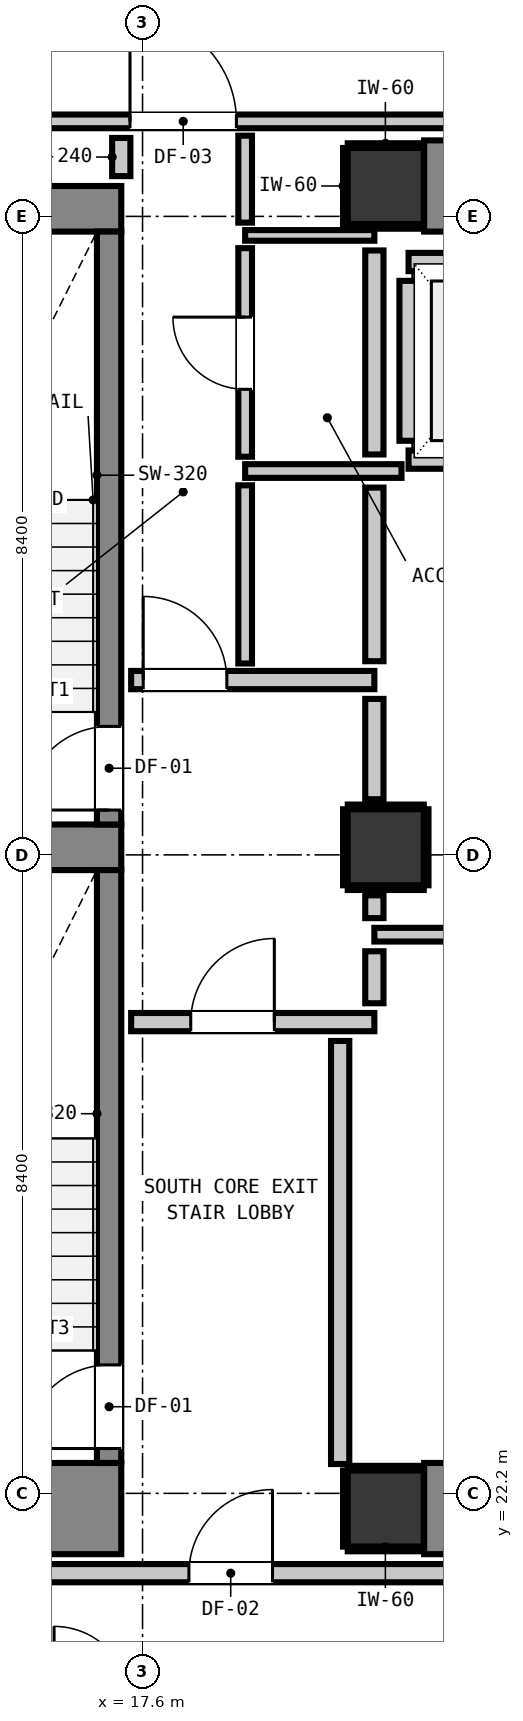
"""IFC4 building model, lengths in metres.
Left out: names, types, materials, properties, quantities, classifications, styles, units other than length and angle.
Written with IfcOpenShell. Run it as: python <this file> out.ifc"""

import sys

from ifc_helpers import new_model, si_unit, direction, frame, frame_2d, origin, origin_2d, place, context, subcontext, project, spatial, rectangle, extrude, element, fill, save


model = new_model("IFC4")
c1 = context("Model", 3, precision=1e-05, world=origin(), true_north=direction((0.0, 1.0)))
c2 = subcontext(c1, "Body", "Model", "MODEL_VIEW")
j1 = project(units=[si_unit("LENGTHUNIT", "METRE"), si_unit("PLANEANGLEUNIT", "RADIAN")], contexts=[c1])
p1 = place(None, origin())
s1 = spatial("IfcSite", under=j1, at=p1, CompositionType="ELEMENT")
p2 = place(p1, origin())
s2 = spatial("IfcBuilding", under=s1, at=p2, CompositionType="ELEMENT")
p3 = place(p2, frame((0.0, 0.0, 55.2)))
s3 = spatial("IfcBuildingStorey", under=s2, at=p3, CompositionType="ELEMENT", Elevation=55.2)
for number, where, z_axis, x_axis in (
    (1, (20.8, 22.0, 0.0), (0.0, 0.0, 1.0), (1.0, 0.0, 0.0)),
    (2, (20.8, 39.4, 0.0), (0.0, 0.0, 1.0), (1.0, 0.0, 0.0)),
):
    element("IfcColumn", number, at=place(p3, frame(where, z_axis=z_axis, x_axis=x_axis)), inside=s3, PredefinedType="COLUMN", context=c2, shape_type="SweptSolid", body=[
        extrude(rectangle(XDim=1.0, YDim=1.0, at=origin_2d()), origin(), (0.0, 0.0, 1.0), 3.32),
    ])
p4 = place(p3, frame((13.24, 22.0, 0.0), z_axis=(0.0, 0.0, 1.0), x_axis=(1.0, 0.0, 0.0)))
e3 = element("IfcWall", 3, at=p4, inside=s3, PredefinedType="SHEAR", context=c2, shape_type="SweptSolid", body=[
    extrude(rectangle(XDim=4.08, YDim=1.2, at=frame_2d((2.04, 0.0))), origin(), (0.0, 0.0, 1.0), 3.32),
])
p5 = place(p3, frame((13.24, 39.1, 0.0), z_axis=(0.0, 0.0, 1.0), x_axis=(1.0, 0.0, 0.0)))
e4 = element("IfcWall", 4, at=p5, inside=s3, PredefinedType="SHEAR", context=c2, shape_type="SweptSolid", body=[
    extrude(rectangle(XDim=4.08, YDim=0.6, at=frame_2d((2.04, 0.0))), origin(), (0.0, 0.0, 1.0), 3.32),
])
p6 = place(p3, frame((13.905, 30.7, 0.0), z_axis=(0.0, 0.0, 1.0), x_axis=(1.0, 0.0, 0.0)))
e5 = element("IfcWall", 5, at=p6, inside=s3, PredefinedType="SHEAR", context=c2, shape_type="SweptSolid", body=[
    extrude(rectangle(XDim=3.415, YDim=0.6, at=frame_2d((1.708, 0.0))), origin(), (0.0, 0.0, 1.0), 3.32),
])
for number, where, z_axis, x_axis in (
    (6, (21.305, 22.0, 0.0), (0.0, 0.0, 1.0), (1.0, 0.0, 0.0)),
    (7, (21.305, 39.4, 0.0), (0.0, 0.0, 1.0), (1.0, 0.0, 0.0)),
):
    element("IfcWall", number, at=place(p3, frame(where, z_axis=z_axis, x_axis=x_axis)), inside=s3, PredefinedType="SHEAR", context=c2, shape_type="SweptSolid", body=[
        extrude(rectangle(XDim=7.39, YDim=1.2, at=frame_2d((3.695, 0.0))), origin(), (0.0, 0.0, 1.0), 3.32),
    ])
p7 = place(p3, frame((17.16, 31.0, 0.0), z_axis=(0.0, 0.0, 1.0), x_axis=(0.0, 1.0, 0.0)))
e8 = element("IfcWall", 8, at=p7, inside=s3, PredefinedType="SHEAR", context=c2, shape_type="SweptSolid", body=[
    extrude(rectangle(XDim=7.8, YDim=0.32, at=frame_2d((3.9, 0.0))), origin(), (0.0, 0.0, 1.0), 3.32),
])
p8 = place(p7, frame((0.19, 0.0, 0.0)))
e9 = element("IfcOpeningElement", 9, at=p8, cuts=e8, PredefinedType="OPENING", context=c2, shape_type="SweptSolid", body=[
    extrude(rectangle(XDim=1.1, YDim=2.15, at=frame_2d((0.55, 1.075))), frame((0.0, 0.17, 0.0), z_axis=(0.0, -1.0, 0.0), x_axis=(1.0, 0.0, 0.0)), (0.0, 0.0, 1.0), 0.34),
])
p9 = place(p3, frame((17.16, 22.6, 0.0), z_axis=(0.0, 0.0, 1.0), x_axis=(0.0, 1.0, 0.0)))
e10 = element("IfcWall", 10, at=p9, inside=s3, PredefinedType="SHEAR", context=c2, shape_type="SweptSolid", body=[
    extrude(rectangle(XDim=7.8, YDim=0.32, at=frame_2d((3.9, 0.0))), origin(), (0.0, 0.0, 1.0), 3.32),
])
p10 = place(p9, frame((0.19, 0.0, 0.0)))
e11 = element("IfcOpeningElement", 11, at=p10, cuts=e10, PredefinedType="OPENING", context=c2, shape_type="SweptSolid", body=[
    extrude(rectangle(XDim=1.1, YDim=2.15, at=frame_2d((0.55, 1.075))), frame((0.0, 0.17, 0.0), z_axis=(0.0, -1.0, 0.0), x_axis=(1.0, 0.0, 0.0)), (0.0, 0.0, 1.0), 0.34),
])
p11 = place(p3, frame((20.8, 30.7, 0.0), z_axis=(0.0, 0.0, 1.0), x_axis=(1.0, 0.0, 0.0)))
e12 = element("IfcColumn", 12, at=p11, inside=s3, PredefinedType="COLUMN", context=c2, shape_type="SweptSolid", body=[
    extrude(rectangle(XDim=1.0, YDim=1.0, at=origin_2d()), origin(), (0.0, 0.0, 1.0), 3.32),
])
for number, where, z_axis, x_axis in (
    (13, (21.1, 35.8, 0.0), (0.0, 0.0, 1.0), (1.0, 0.0, 0.0)),
    (14, (21.1, 38.4, 0.0), (0.0, 0.0, 1.0), (1.0, 0.0, 0.0)),
):
    element("IfcWall", number, at=place(p3, frame(where, z_axis=z_axis, x_axis=x_axis)), inside=s3, PredefinedType="PARTITIONING", context=c2, shape_type="SweptSolid", body=[
        extrude(rectangle(XDim=2.2, YDim=0.24, at=frame_2d((1.1, 0.0))), origin(), (0.0, 0.0, 1.0), 3.06),
    ])
p12 = place(p3, frame((21.1, 36.048, 0.0), z_axis=(0.0, 0.0, 1.0), x_axis=(0.0, 1.0, 0.0)))
e15 = element("IfcWall", 15, at=p12, inside=s3, PredefinedType="PARTITIONING", context=c2, shape_type="SweptSolid", body=[
    extrude(rectangle(XDim=2.104, YDim=0.24, at=frame_2d((1.052, 0.0))), origin(), (0.0, 0.0, 1.0), 2.295),
])
p13 = place(p3, frame((10.15, 21.15, 0.0), z_axis=(0.0, 0.0, 1.0), x_axis=(1.0, 0.0, 0.0)))
e16 = element("IfcWall", 16, at=p13, inside=s3, PredefinedType="PARTITIONING", context=c2, shape_type="SweptSolid", body=[
    extrude(rectangle(XDim=40.023, YDim=0.24, at=frame_2d((20.012, 0.0))), origin(), (0.0, 0.0, 1.0), 3.06),
])
p14 = place(p13, frame((8.06, 0.0, 0.0)))
e17 = element("IfcOpeningElement", 17, at=p14, cuts=e16, PredefinedType="OPENING", context=c2, shape_type="SweptSolid", body=[
    extrude(rectangle(XDim=1.1, YDim=2.15, at=frame_2d((0.55, 1.075))), frame((0.0, 0.13, 0.0), z_axis=(0.0, -1.0, 0.0), x_axis=(1.0, 0.0, 0.0)), (0.0, 0.0, 1.0), 0.26),
])
p15 = place(p13, frame((0.324, 0.0, 0.0)))
e18 = element("IfcOpeningElement", 18, at=p15, cuts=e16, PredefinedType="OPENING", context=c2, shape_type="SweptSolid", body=[
    extrude(rectangle(XDim=1.4, YDim=2.15, at=frame_2d((0.7, 1.075))), frame((0.0, 0.13, 0.0), z_axis=(0.0, -1.0, 0.0), x_axis=(1.0, 0.0, 0.0)), (0.0, 0.0, 1.0), 0.26),
])
p16 = place(p13, frame((31.825, 0.0, 0.0)))
e19 = element("IfcOpeningElement", 19, at=p16, cuts=e16, PredefinedType="OPENING", context=c2, shape_type="SweptSolid", body=[
    extrude(rectangle(XDim=1.0, YDim=2.15, at=frame_2d((0.5, 1.075))), frame((0.0, 0.13, 0.0), z_axis=(0.0, -1.0, 0.0), x_axis=(1.0, 0.0, 0.0)), (0.0, 0.0, 1.0), 0.26),
])
p17 = place(p3, frame((17.45, 28.4, 0.0), z_axis=(0.0, 0.0, 1.0), x_axis=(1.0, 0.0, 0.0)))
e20 = element("IfcWall", 20, at=p17, inside=s3, PredefinedType="PARTITIONING", context=c2, shape_type="SweptSolid", body=[
    extrude(rectangle(XDim=3.2, YDim=0.24, at=frame_2d((1.6, 0.0))), origin(), (0.0, 0.0, 1.0), 3.06),
])
p18 = place(p17, frame((0.784, 0.0, 0.0)))
e21 = element("IfcOpeningElement", 21, at=p18, cuts=e20, PredefinedType="OPENING", context=c2, shape_type="SweptSolid", body=[
    extrude(rectangle(XDim=1.1, YDim=2.15, at=frame_2d((0.55, 1.075))), frame((0.0, 0.13, 0.0), z_axis=(0.0, -1.0, 0.0), x_axis=(1.0, 0.0, 0.0)), (0.0, 0.0, 1.0), 0.26),
])
p19 = place(p3, frame((17.45, 32.9, 0.0), z_axis=(0.0, 0.0, 1.0), x_axis=(1.0, 0.0, 0.0)))
e22 = element("IfcWall", 22, at=p19, inside=s3, PredefinedType="PARTITIONING", context=c2, shape_type="SweptSolid", body=[
    extrude(rectangle(XDim=3.2, YDim=0.24, at=frame_2d((1.6, 0.0))), origin(), (0.0, 0.0, 1.0), 3.06),
])
p20 = place(p19, frame((0.159, 0.0, 0.0)))
e23 = element("IfcOpeningElement", 23, at=p20, cuts=e22, PredefinedType="OPENING", context=c2, shape_type="SweptSolid", body=[
    extrude(rectangle(XDim=1.1, YDim=2.15, at=frame_2d((0.55, 1.075))), frame((0.0, 0.13, 0.0), z_axis=(0.0, -1.0, 0.0), x_axis=(1.0, 0.0, 0.0)), (0.0, 0.0, 1.0), 0.26),
])
p21 = place(p3, frame((20.65, 29.55, 0.0), z_axis=(0.0, 0.0, 1.0), x_axis=(1.0, 0.0, 0.0)))
e24 = element("IfcWall", 24, at=p21, inside=s3, PredefinedType="PARTITIONING", context=c2, shape_type="SweptSolid", body=[
    extrude(rectangle(XDim=9.325, YDim=0.18, at=frame_2d((4.663, 0.0))), origin(), (0.0, 0.0, 1.0), 3.06),
])
p22 = place(p3, frame((18.95, 35.65, 0.0), z_axis=(0.0, 0.0, 1.0), x_axis=(1.0, 0.0, 0.0)))
e25 = element("IfcWall", 25, at=p22, inside=s3, PredefinedType="PARTITIONING", context=c2, shape_type="SweptSolid", body=[
    extrude(rectangle(XDim=2.057, YDim=0.18, at=frame_2d((1.029, 0.0))), origin(), (0.0, 0.0, 1.0), 3.06),
])
p23 = place(p3, frame((8.027, 40.25, 0.0), z_axis=(0.0, 0.0, 1.0), x_axis=(1.0, 0.0, 0.0)))
e26 = element("IfcWall", 26, at=p23, inside=s3, PredefinedType="PARTITIONING", context=c2, shape_type="SweptSolid", body=[
    extrude(rectangle(XDim=28.905, YDim=0.18, at=frame_2d((14.452, 0.0))), origin(), (0.0, 0.0, 1.0), 3.06),
])
p24 = place(p23, frame((9.408, 0.0, 0.0)))
e27 = element("IfcOpeningElement", 27, at=p24, cuts=e26, PredefinedType="OPENING", context=c2, shape_type="SweptSolid", body=[
    extrude(rectangle(XDim=1.4, YDim=2.15, at=frame_2d((0.7, 1.075))), frame((0.0, 0.1, 0.0), z_axis=(0.0, -1.0, 0.0), x_axis=(1.0, 0.0, 0.0)), (0.0, 0.0, 1.0), 0.2),
])
p25 = place(p23, frame((2.447, 0.0, 0.0)))
e28 = element("IfcOpeningElement", 28, at=p25, cuts=e26, PredefinedType="OPENING", context=c2, shape_type="SweptSolid", body=[
    extrude(rectangle(XDim=1.4, YDim=2.15, at=frame_2d((0.7, 1.075))), frame((0.0, 0.1, 0.0), z_axis=(0.0, -1.0, 0.0), x_axis=(1.0, 0.0, 0.0)), (0.0, 0.0, 1.0), 0.2),
])
p26 = place(p3, frame((18.95, 38.75, 0.0), z_axis=(0.0, 0.0, 1.0), x_axis=(1.0, 0.0, 0.0)))
e29 = element("IfcWall", 29, at=p26, inside=s3, PredefinedType="PARTITIONING", context=c2, shape_type="SweptSolid", body=[
    extrude(rectangle(XDim=1.7, YDim=0.14, at=frame_2d((0.85, 0.0))), origin(), (0.0, 0.0, 1.0), 3.06),
])
p27 = place(p3, frame((17.32, 39.53, 0.0), z_axis=(0.0, 0.0, 1.0), x_axis=(0.0, 1.0, 0.0)))
e30 = element("IfcWall", 30, at=p27, inside=s3, PredefinedType="PARTITIONING", context=c2, shape_type="SweptSolid", body=[
    extrude(rectangle(XDim=0.502, YDim=0.24, at=frame_2d((0.251, 0.0))), origin(), (0.0, 0.0, 1.0), 3.06),
])
p28 = place(p3, frame((20.2, 22.586, 0.0), z_axis=(0.0, 0.0, 1.0), x_axis=(0.0, 1.0, 0.0)))
e31 = element("IfcWall", 31, at=p28, inside=s3, PredefinedType="PARTITIONING", context=c2, shape_type="SweptSolid", body=[
    extrude(rectangle(XDim=5.566, YDim=0.24, at=frame_2d((2.783, 0.0))), origin(), (0.0, 0.0, 1.0), 3.06),
])
p29 = place(p3, frame((20.65, 28.648, 0.0), z_axis=(0.0, 0.0, 1.0), x_axis=(0.0, 1.0, 0.0)))
e32 = element("IfcWall", 32, at=p29, inside=s3, PredefinedType="PARTITIONING", context=c2, shape_type="SweptSolid", body=[
    extrude(rectangle(XDim=0.684, YDim=0.24, at=frame_2d((0.342, 0.0))), origin(), (0.0, 0.0, 1.0), 2.295),
])
p30 = place(p3, frame((20.65, 29.768, 0.0), z_axis=(0.0, 0.0, 1.0), x_axis=(0.0, 1.0, 0.0)))
e33 = element("IfcWall", 33, at=p30, inside=s3, PredefinedType="PARTITIONING", context=c2, shape_type="SweptSolid", body=[
    extrude(rectangle(XDim=0.3, YDim=0.24, at=frame_2d((0.15, 0.0))), origin(), (0.0, 0.0, 1.0), 2.295),
])
p31 = place(p3, frame((20.65, 31.332, 0.0), z_axis=(0.0, 0.0, 1.0), x_axis=(0.0, 1.0, 0.0)))
e34 = element("IfcWall", 34, at=p31, inside=s3, PredefinedType="PARTITIONING", context=c2, shape_type="SweptSolid", body=[
    extrude(rectangle(XDim=1.32, YDim=0.24, at=frame_2d((0.66, 0.0))), origin(), (0.0, 0.0, 1.0), 2.295),
])
p32 = place(p3, frame((20.65, 33.148, 0.0), z_axis=(0.0, 0.0, 1.0), x_axis=(0.0, 1.0, 0.0)))
e35 = element("IfcWall", 35, at=p32, inside=s3, PredefinedType="PARTITIONING", context=c2, shape_type="SweptSolid", body=[
    extrude(rectangle(XDim=2.284, YDim=0.24, at=frame_2d((1.142, 0.0))), origin(), (0.0, 0.0, 1.0), 2.295),
])
p33 = place(p3, frame((20.65, 35.868, 0.0), z_axis=(0.0, 0.0, 1.0), x_axis=(0.0, 1.0, 0.0)))
e36 = element("IfcWall", 36, at=p33, inside=s3, PredefinedType="PARTITIONING", context=c2, shape_type="SweptSolid", body=[
    extrude(rectangle(XDim=2.684, YDim=0.24, at=frame_2d((1.342, 0.0))), origin(), (0.0, 0.0, 1.0), 2.295),
])
p34 = place(p3, frame((18.95, 33.118, 0.0), z_axis=(0.0, 0.0, 1.0), x_axis=(0.0, 1.0, 0.0)))
e37 = element("IfcWall", 37, at=p34, inside=s3, PredefinedType="PARTITIONING", context=c2, shape_type="SweptSolid", body=[
    extrude(rectangle(XDim=2.344, YDim=0.18, at=frame_2d((1.172, 0.0))), origin(), (0.0, 0.0, 1.0), 3.06),
])
p35 = place(p3, frame((18.95, 35.838, 0.0), z_axis=(0.0, 0.0, 1.0), x_axis=(0.0, 1.0, 0.0)))
e38 = element("IfcWall", 38, at=p35, inside=s3, PredefinedType="PARTITIONING", context=c2, shape_type="SweptSolid", body=[
    extrude(rectangle(XDim=2.744, YDim=0.18, at=frame_2d((1.372, 0.0))), origin(), (0.0, 0.0, 1.0), 3.06),
])
p36 = place(p35, frame((0.887, 0.0, 0.0)))
e39 = element("IfcOpeningElement", 39, at=p36, cuts=e38, PredefinedType="OPENING", context=c2, shape_type="SweptSolid", body=[
    extrude(rectangle(XDim=0.95, YDim=2.1, at=frame_2d((0.475, 1.05))), frame((0.0, 0.1, 0.0), z_axis=(0.0, -1.0, 0.0), x_axis=(1.0, 0.0, 0.0)), (0.0, 0.0, 1.0), 0.2),
])
p37 = place(p3, frame((18.95, 38.918, 0.0), z_axis=(0.0, 0.0, 1.0), x_axis=(0.0, 1.0, 0.0)))
e40 = element("IfcWall", 40, at=p37, inside=s3, PredefinedType="PARTITIONING", context=c2, shape_type="SweptSolid", body=[
    extrude(rectangle(XDim=1.144, YDim=0.18, at=frame_2d((0.572, 0.0))), origin(), (0.0, 0.0, 1.0), 3.06),
])
for number, where, z_axis, x_axis in (
    (41, (20.3, 21.468, 0.0), (0.0, 0.0, 1.0), (1.0, 0.0, 0.0)),
    (42, (20.3, 22.532, 0.0), (0.0, 0.0, 1.0), (1.0, 0.0, 0.0)),
):
    element("IfcWall", number, at=place(p3, frame(where, z_axis=z_axis, x_axis=x_axis)), inside=s3, PredefinedType="PARTITIONING", context=c2, shape_type="SweptSolid", body=[
        extrude(rectangle(XDim=0.99, YDim=0.06, at=frame_2d((0.495, 0.0))), origin(), (0.0, 0.0, 1.0), 1.45),
    ])
p38 = place(p3, frame((20.268, 21.5, 0.0), z_axis=(0.0, 0.0, 1.0), x_axis=(0.0, 1.0, 0.0)))
e43 = element("IfcWall", 43, at=p38, inside=s3, PredefinedType="PARTITIONING", context=c2, shape_type="SweptSolid", body=[
    extrude(rectangle(XDim=1.0, YDim=0.06, at=frame_2d((0.5, 0.0))), origin(), (0.0, 0.0, 1.0), 1.45),
])
for number, where, z_axis, x_axis in (
    (44, (20.3, 38.868, 0.0), (0.0, 0.0, 1.0), (1.0, 0.0, 0.0)),
    (45, (20.3, 39.932, 0.0), (0.0, 0.0, 1.0), (1.0, 0.0, 0.0)),
):
    element("IfcWall", number, at=place(p3, frame(where, z_axis=z_axis, x_axis=x_axis)), inside=s3, PredefinedType="PARTITIONING", context=c2, shape_type="SweptSolid", body=[
        extrude(rectangle(XDim=0.99, YDim=0.06, at=frame_2d((0.495, 0.0))), origin(), (0.0, 0.0, 1.0), 1.45),
    ])
for number, where, z_axis, x_axis in (
    (46, (20.268, 38.9, 0.0), (0.0, 0.0, 1.0), (0.0, 1.0, 0.0)),
    (47, (20.3, 30.168, 0.0), (0.0, 0.0, 1.0), (1.0, 0.0, 0.0)),
    (48, (20.3, 31.232, 0.0), (0.0, 0.0, 1.0), (1.0, 0.0, 0.0)),
    (49, (20.268, 30.2, 0.0), (0.0, 0.0, 1.0), (0.0, 1.0, 0.0)),
    (50, (21.332, 30.2, 0.0), (0.0, 0.0, 1.0), (0.0, 1.0, 0.0)),
):
    element("IfcWall", number, at=place(p3, frame(where, z_axis=z_axis, x_axis=x_axis)), inside=s3, PredefinedType="PARTITIONING", context=c2, shape_type="SweptSolid", body=[
        extrude(rectangle(XDim=1.0, YDim=0.06, at=frame_2d((0.5, 0.0))), origin(), (0.0, 0.0, 1.0), 1.45),
    ])
p39 = place(p8, origin())
e51 = element("IfcDoor", 51, at=p39, inside=s3, OperationType="SINGLE_SWING_LEFT", PredefinedType="DOOR", context=c2, shape_type="SweptSolid", body=[
    extrude(rectangle(XDim=1.1, YDim=2.15, at=frame_2d((0.55, 1.075))), frame((0.0, 0.025, 0.0), z_axis=(0.0, -1.0, 0.0), x_axis=(1.0, 0.0, 0.0)), (0.0, 0.0, 1.0), 0.05),
])
fill(e9, e51)
p40 = place(p10, origin())
e52 = element("IfcDoor", 52, at=p40, inside=s3, OperationType="SINGLE_SWING_LEFT", PredefinedType="DOOR", context=c2, shape_type="SweptSolid", body=[
    extrude(rectangle(XDim=1.1, YDim=2.15, at=frame_2d((0.55, 1.075))), frame((0.0, 0.025, 0.0), z_axis=(0.0, -1.0, 0.0), x_axis=(1.0, 0.0, 0.0)), (0.0, 0.0, 1.0), 0.05),
])
fill(e11, e52)
p41 = place(p18, origin())
e53 = element("IfcDoor", 53, at=p41, inside=s3, OperationType="SINGLE_SWING_RIGHT", PredefinedType="DOOR", context=c2, shape_type="SweptSolid", body=[
    extrude(rectangle(XDim=1.1, YDim=2.15, at=frame_2d((0.55, 1.075))), frame((0.0, 0.025, 0.0), z_axis=(0.0, -1.0, 0.0), x_axis=(1.0, 0.0, 0.0)), (0.0, 0.0, 1.0), 0.05),
])
fill(e21, e53)
p42 = place(p20, origin())
e54 = element("IfcDoor", 54, at=p42, inside=s3, OperationType="SINGLE_SWING_LEFT", PredefinedType="DOOR", context=c2, shape_type="SweptSolid", body=[
    extrude(rectangle(XDim=1.1, YDim=2.15, at=frame_2d((0.55, 1.075))), frame((0.0, 0.025, 0.0), z_axis=(0.0, -1.0, 0.0), x_axis=(1.0, 0.0, 0.0)), (0.0, 0.0, 1.0), 0.05),
])
fill(e23, e54)
p43 = place(p14, origin())
e55 = element("IfcDoor", 55, at=p43, inside=s3, OperationType="SINGLE_SWING_RIGHT", PredefinedType="DOOR", context=c2, shape_type="SweptSolid", body=[
    extrude(rectangle(XDim=1.1, YDim=2.15, at=frame_2d((0.55, 1.075))), frame((0.0, 0.025, 0.0), z_axis=(0.0, -1.0, 0.0), x_axis=(1.0, 0.0, 0.0)), (0.0, 0.0, 1.0), 0.05),
])
fill(e17, e55)
p44 = place(p24, origin())
e56 = element("IfcDoor", 56, at=p44, inside=s3, OperationType="SINGLE_SWING_LEFT", PredefinedType="DOOR", context=c2, shape_type="SweptSolid", body=[
    extrude(rectangle(XDim=1.4, YDim=2.15, at=frame_2d((0.7, 1.075))), frame((0.0, 0.025, 0.0), z_axis=(0.0, -1.0, 0.0), x_axis=(1.0, 0.0, 0.0)), (0.0, 0.0, 1.0), 0.05),
])
fill(e27, e56)
p45 = place(p36, origin())
e57 = element("IfcDoor", 57, at=p45, inside=s3, OperationType="SINGLE_SWING_RIGHT", PredefinedType="DOOR", context=c2, shape_type="SweptSolid", body=[
    extrude(rectangle(XDim=0.95, YDim=2.1, at=frame_2d((0.475, 1.05))), frame((0.0, 0.025, 0.0), z_axis=(0.0, -1.0, 0.0), x_axis=(1.0, 0.0, 0.0)), (0.0, 0.0, 1.0), 0.05),
])
fill(e39, e57)
save(model, sys.argv[1])
